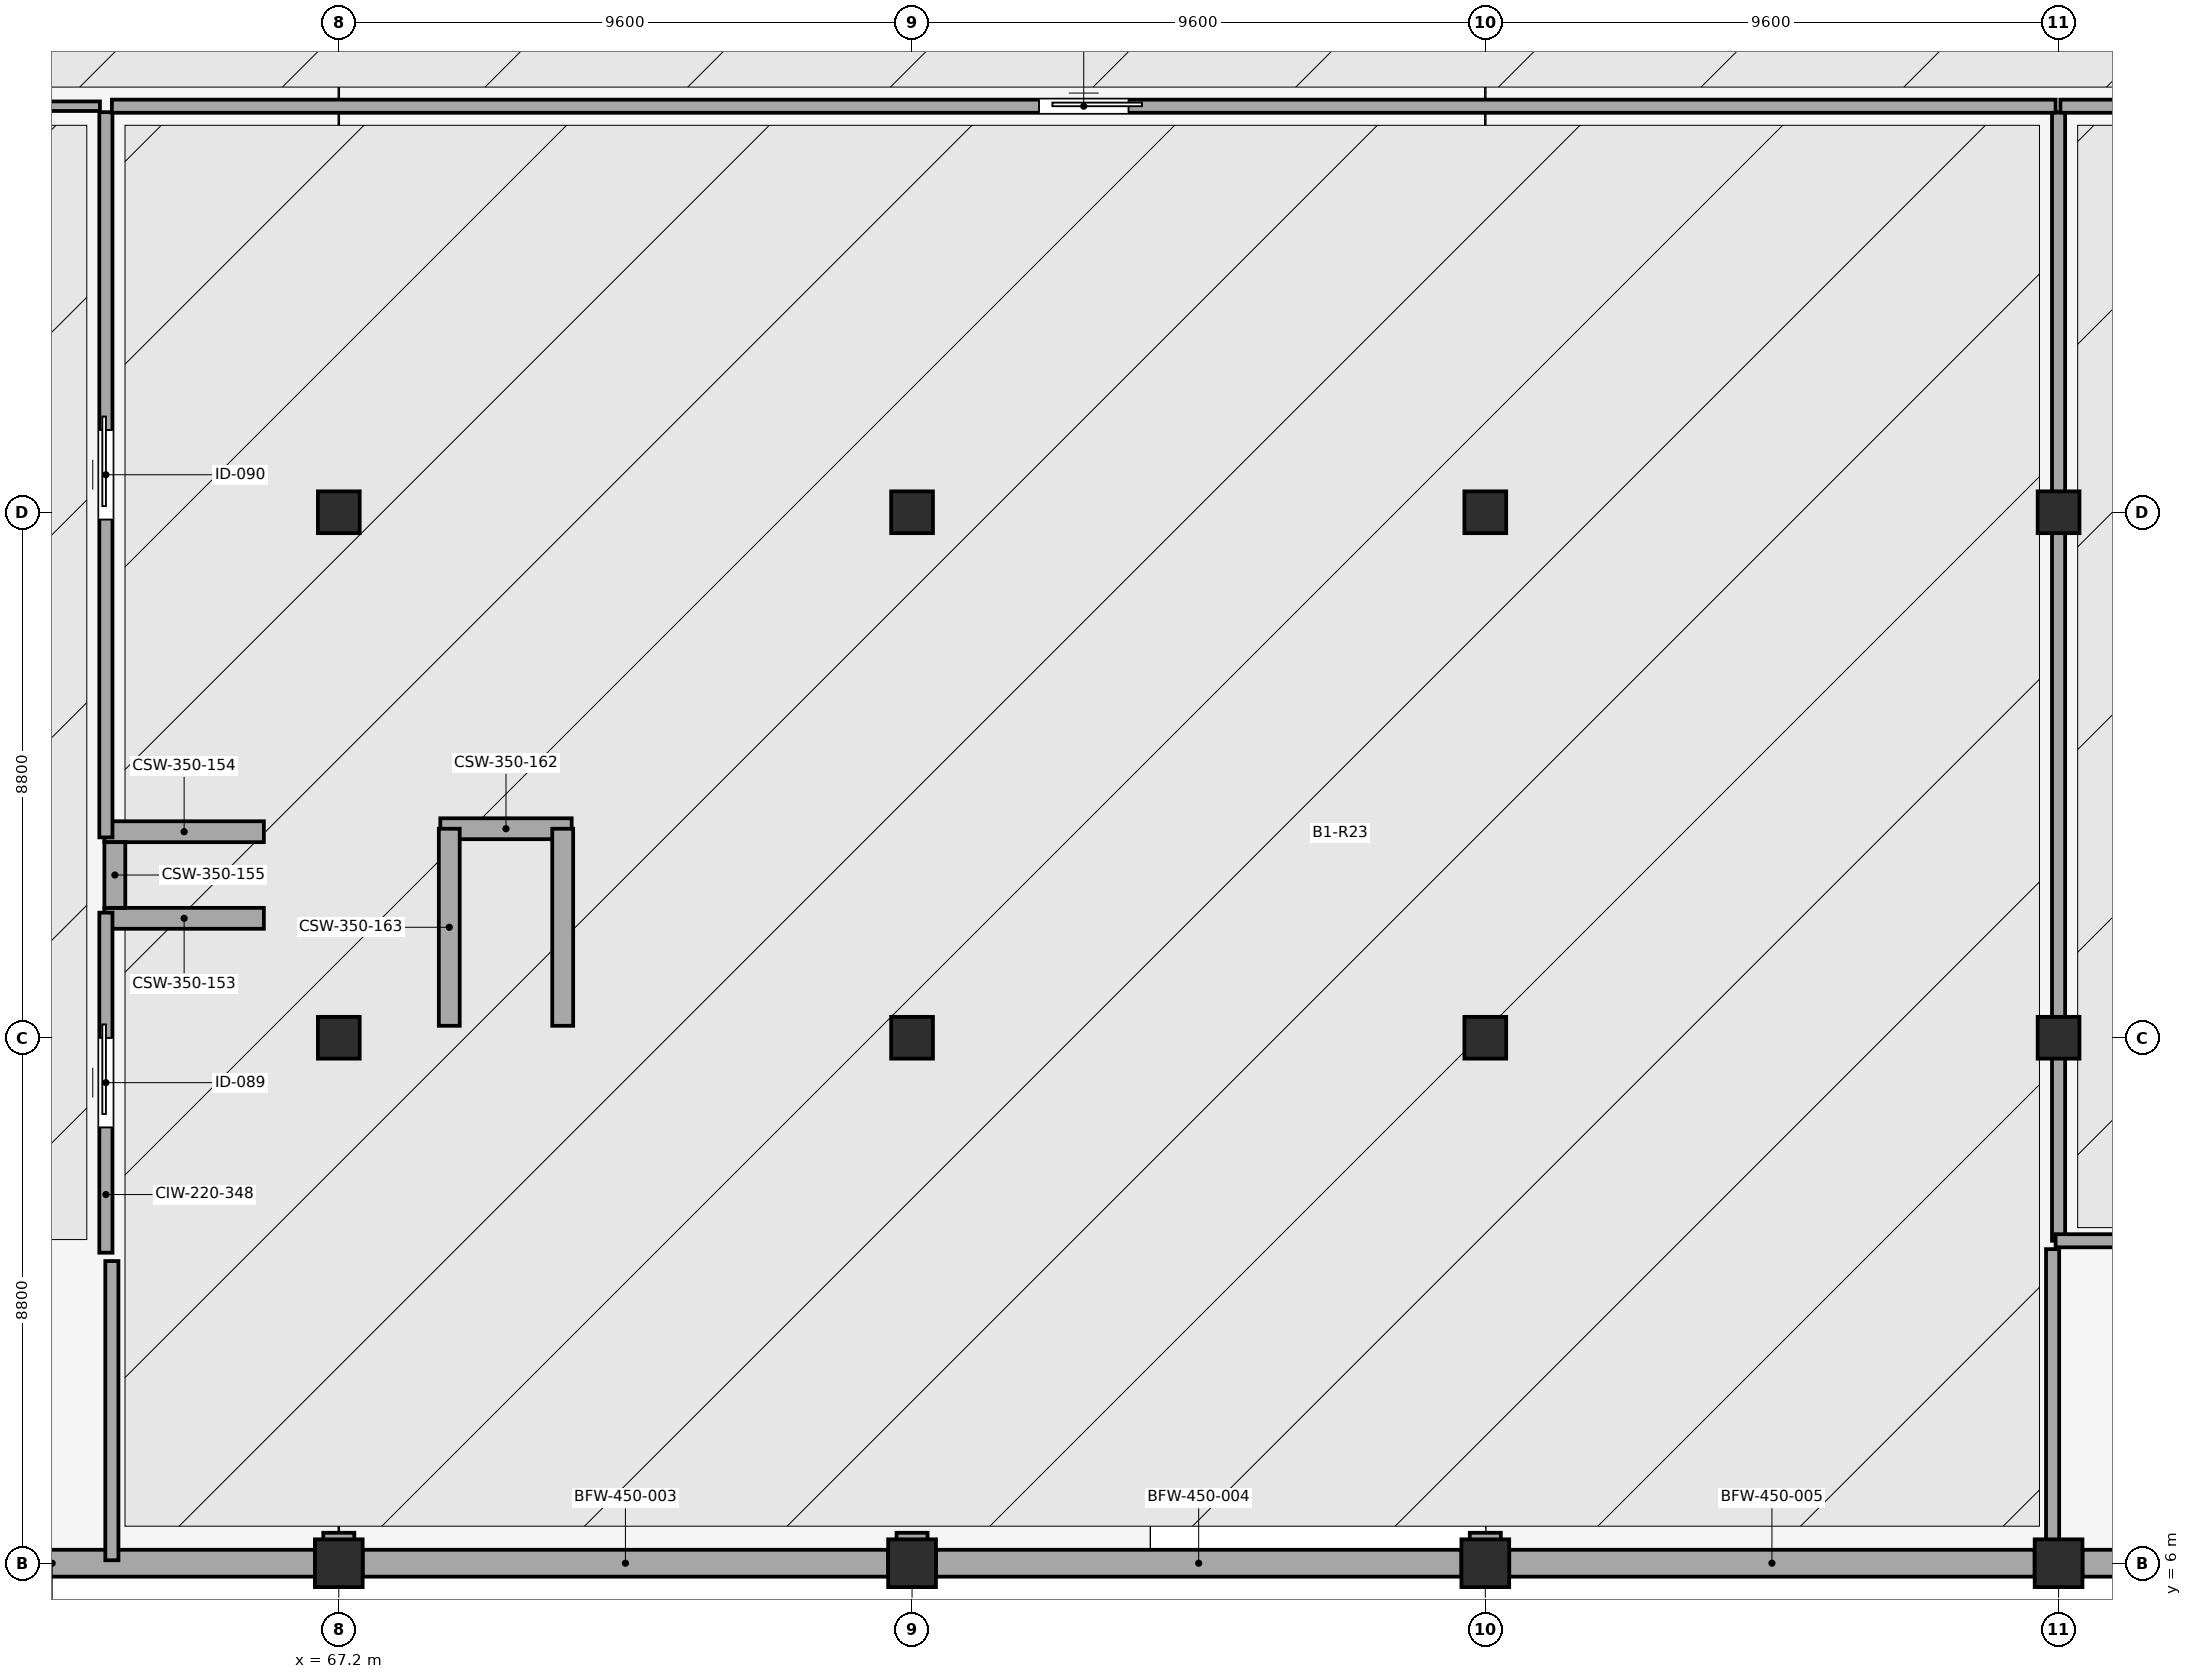
"""IFC4 building model, lengths in metres.
Left out: names, types, materials, properties, quantities, classifications, styles, units other than length and angle.
Written with IfcOpenShell. Run it as: python <this file> out.ifc"""

import sys

from ifc_helpers import new_model, si_unit, direction, frame, frame_2d, origin, origin_2d, place, context, subcontext, project, spatial, rectangle, extrude, element, fill, save


model = new_model("IFC4")
c1 = context("Model", 3, precision=1e-05, world=origin(), true_north=direction((0.0, 1.0)))
c2 = subcontext(c1, "Body", "Model", "MODEL_VIEW")
j1 = project(units=[si_unit("LENGTHUNIT", "METRE"), si_unit("PLANEANGLEUNIT", "RADIAN")], contexts=[c1])
p1 = place(None, origin())
s1 = spatial("IfcSite", under=j1, at=p1, CompositionType="ELEMENT")
p2 = place(p1, origin())
s2 = spatial("IfcBuilding", under=s1, at=p2, CompositionType="ELEMENT")
p3 = place(p2, frame((0.0, 0.0, -4.2)))
s3 = spatial("IfcBuildingStorey", under=s2, at=p3, CompositionType="ELEMENT", Elevation=-4.2)
p4 = place(p3, frame((67.2, 6.0, 0.0), z_axis=(0.0, 0.0, 1.0), x_axis=(1.0, 0.0, 0.0)))
e1 = element("IfcColumn", 1, at=p4, inside=s3, PredefinedType="COLUMN", context=c2, shape_type="SweptSolid", body=[
    extrude(rectangle(XDim=0.8, YDim=0.8, at=origin_2d()), origin(), (0.0, 0.0, 1.0), 4.2),
])
for number, where, z_axis, x_axis in (
    (2, (67.2, 14.8, 0.0), (0.0, 0.0, 1.0), (1.0, 0.0, 0.0)),
    (3, (67.2, 23.6, 0.0), (0.0, 0.0, 1.0), (1.0, 0.0, 0.0)),
):
    element("IfcColumn", number, at=place(p3, frame(where, z_axis=z_axis, x_axis=x_axis)), inside=s3, PredefinedType="COLUMN", context=c2, shape_type="SweptSolid", body=[
        extrude(rectangle(XDim=0.7, YDim=0.7, at=origin_2d()), origin(), (0.0, 0.0, 1.0), 4.2),
    ])
p5 = place(p3, frame((76.8, 6.0, 0.0), z_axis=(0.0, 0.0, 1.0), x_axis=(1.0, 0.0, 0.0)))
e4 = element("IfcColumn", 4, at=p5, inside=s3, PredefinedType="COLUMN", context=c2, shape_type="SweptSolid", body=[
    extrude(rectangle(XDim=0.8, YDim=0.8, at=origin_2d()), origin(), (0.0, 0.0, 1.0), 4.2),
])
for number, where, z_axis, x_axis in (
    (5, (76.8, 14.8, 0.0), (0.0, 0.0, 1.0), (1.0, 0.0, 0.0)),
    (6, (76.8, 23.6, 0.0), (0.0, 0.0, 1.0), (1.0, 0.0, 0.0)),
):
    element("IfcColumn", number, at=place(p3, frame(where, z_axis=z_axis, x_axis=x_axis)), inside=s3, PredefinedType="COLUMN", context=c2, shape_type="SweptSolid", body=[
        extrude(rectangle(XDim=0.7, YDim=0.7, at=origin_2d()), origin(), (0.0, 0.0, 1.0), 4.2),
    ])
p6 = place(p3, frame((86.4, 6.0, 0.0), z_axis=(0.0, 0.0, 1.0), x_axis=(1.0, 0.0, 0.0)))
e7 = element("IfcColumn", 7, at=p6, inside=s3, PredefinedType="COLUMN", context=c2, shape_type="SweptSolid", body=[
    extrude(rectangle(XDim=0.8, YDim=0.8, at=origin_2d()), origin(), (0.0, 0.0, 1.0), 4.2),
])
for number, where, z_axis, x_axis in (
    (8, (86.4, 14.8, 0.0), (0.0, 0.0, 1.0), (1.0, 0.0, 0.0)),
    (9, (86.4, 23.6, 0.0), (0.0, 0.0, 1.0), (1.0, 0.0, 0.0)),
):
    element("IfcColumn", number, at=place(p3, frame(where, z_axis=z_axis, x_axis=x_axis)), inside=s3, PredefinedType="COLUMN", context=c2, shape_type="SweptSolid", body=[
        extrude(rectangle(XDim=0.7, YDim=0.7, at=origin_2d()), origin(), (0.0, 0.0, 1.0), 4.2),
    ])
p7 = place(p3, frame((96.0, 6.0, 0.0), z_axis=(0.0, 0.0, 1.0), x_axis=(1.0, 0.0, 0.0)))
e10 = element("IfcColumn", 10, at=p7, inside=s3, PredefinedType="COLUMN", context=c2, shape_type="SweptSolid", body=[
    extrude(rectangle(XDim=0.8, YDim=0.8, at=origin_2d()), origin(), (0.0, 0.0, 1.0), 4.2),
])
for number, where, z_axis, x_axis in (
    (11, (96.0, 14.8, 0.0), (0.0, 0.0, 1.0), (1.0, 0.0, 0.0)),
    (12, (96.0, 23.6, 0.0), (0.0, 0.0, 1.0), (1.0, 0.0, 0.0)),
):
    element("IfcColumn", number, at=place(p3, frame(where, z_axis=z_axis, x_axis=x_axis)), inside=s3, PredefinedType="COLUMN", context=c2, shape_type="SweptSolid", body=[
        extrude(rectangle(XDim=0.7, YDim=0.7, at=origin_2d()), origin(), (0.0, 0.0, 1.0), 4.2),
    ])
p8 = place(p3, frame((58.0, 6.0, 0.0), z_axis=(0.0, 0.0, 1.0), x_axis=(1.0, 0.0, 0.0)))
e13 = element("IfcWall", 13, at=p8, inside=s3, PredefinedType="SOLIDWALL", context=c2, shape_type="SweptSolid", body=[
    extrude(rectangle(XDim=8.8, YDim=0.45, at=frame_2d((4.4, 0.0))), origin(), (0.0, 0.0, 1.0), 3.84),
])
p9 = place(p3, frame((67.6, 6.0, 0.0), z_axis=(0.0, 0.0, 1.0), x_axis=(1.0, 0.0, 0.0)))
e14 = element("IfcWall", 14, at=p9, inside=s3, PredefinedType="SOLIDWALL", context=c2, shape_type="SweptSolid", body=[
    extrude(rectangle(XDim=8.8, YDim=0.45, at=frame_2d((4.4, 0.0))), origin(), (0.0, 0.0, 1.0), 3.84),
])
for number, where, z_axis, x_axis in (
    (15, (77.2, 6.0, 0.0), (0.0, 0.0, 1.0), (1.0, 0.0, 0.0)),
    (16, (86.8, 6.0, 0.0), (0.0, 0.0, 1.0), (1.0, 0.0, 0.0)),
    (17, (96.4, 6.0, 0.0), (0.0, 0.0, 1.0), (1.0, 0.0, 0.0)),
):
    element("IfcWall", number, at=place(p3, frame(where, z_axis=z_axis, x_axis=x_axis)), inside=s3, PredefinedType="SOLIDWALL", context=c2, shape_type="SweptSolid", body=[
        extrude(rectangle(XDim=8.8, YDim=0.45, at=frame_2d((4.4, 0.0))), origin(), (0.0, 0.0, 1.0), 3.84),
    ])
for number, where, z_axis, x_axis in (
    (18, (63.275, 16.8, 0.0), (0.0, 0.0, 1.0), (1.0, 0.0, 0.0)),
    (19, (63.275, 18.25, 0.0), (0.0, 0.0, 1.0), (1.0, 0.0, 0.0)),
):
    element("IfcWall", number, at=place(p3, frame(where, z_axis=z_axis, x_axis=x_axis)), inside=s3, PredefinedType="SHEAR", context=c2, shape_type="SweptSolid", body=[
        extrude(rectangle(XDim=2.67, YDim=0.35, at=frame_2d((1.335, 0.0))), origin(), (0.0, 0.0, 1.0), 3.92),
    ])
p10 = place(p3, frame((63.45, 16.975, 0.0), z_axis=(0.0, 0.0, 1.0), x_axis=(0.0, 1.0, 0.0)))
e20 = element("IfcWall", 20, at=p10, inside=s3, PredefinedType="SHEAR", context=c2, shape_type="SweptSolid", body=[
    extrude(rectangle(XDim=1.1, YDim=0.35, at=frame_2d((0.55, 0.0))), origin(), (0.0, 0.0, 1.0), 3.92),
])
p11 = place(p3, frame((68.9, 18.3, 0.0), z_axis=(0.0, 0.0, 1.0), x_axis=(1.0, 0.0, 0.0)))
e21 = element("IfcWall", 21, at=p11, inside=s3, PredefinedType="SHEAR", context=c2, shape_type="SweptSolid", body=[
    extrude(rectangle(XDim=2.2, YDim=0.35, at=frame_2d((1.1, 0.0))), origin(), (0.0, 0.0, 1.0), 3.92),
])
for number, where, z_axis, x_axis in (
    (22, (69.05, 15.0, 0.0), (0.0, 0.0, 1.0), (0.0, 1.0, 0.0)),
    (23, (70.95, 15.0, 0.0), (0.0, 0.0, 1.0), (0.0, 1.0, 0.0)),
):
    element("IfcWall", number, at=place(p3, frame(where, z_axis=z_axis, x_axis=x_axis)), inside=s3, PredefinedType="SHEAR", context=c2, shape_type="SweptSolid", body=[
        extrude(rectangle(XDim=3.3, YDim=0.35, at=frame_2d((1.65, 0.0))), origin(), (0.0, 0.0, 1.0), 3.92),
    ])
p12 = place(p3, frame((63.3, 11.2, 0.0), z_axis=(0.0, 0.0, 1.0), x_axis=(0.0, 1.0, 0.0)))
e24 = element("IfcWall", 24, at=p12, inside=s3, PredefinedType="PARTITIONING", context=c2, shape_type="SweptSolid", body=[
    extrude(rectangle(XDim=5.695, YDim=0.22, at=frame_2d((2.848, 0.0))), origin(), (0.0, 0.0, 1.0), 3.84),
])
p13 = place(p12, frame((2.098, 0.0, 0.0)))
e25 = element("IfcOpeningElement", 25, at=p13, cuts=e24, PredefinedType="OPENING", context=c2, shape_type="SweptSolid", body=[
    extrude(rectangle(XDim=1.5, YDim=2.2, at=frame_2d((0.75, 1.1))), frame((0.0, 0.12, 0.0), z_axis=(0.0, -1.0, 0.0), x_axis=(1.0, 0.0, 0.0)), (0.0, 0.0, 1.0), 0.24),
])
p14 = place(p3, frame((63.3, 18.155, 0.0), z_axis=(0.0, 0.0, 1.0), x_axis=(0.0, 1.0, 0.0)))
e26 = element("IfcWall", 26, at=p14, inside=s3, PredefinedType="PARTITIONING", context=c2, shape_type="SweptSolid", body=[
    extrude(rectangle(XDim=12.145, YDim=0.22, at=frame_2d((6.073, 0.0))), origin(), (0.0, 0.0, 1.0), 3.84),
])
p15 = place(p14, frame((5.323, 0.0, 0.0)))
e27 = element("IfcOpeningElement", 27, at=p15, cuts=e26, PredefinedType="OPENING", context=c2, shape_type="SweptSolid", body=[
    extrude(rectangle(XDim=1.5, YDim=2.2, at=frame_2d((0.75, 1.1))), frame((0.0, 0.12, 0.0), z_axis=(0.0, -1.0, 0.0), x_axis=(1.0, 0.0, 0.0)), (0.0, 0.0, 1.0), 0.24),
])
p16 = place(p3, frame((55.8, 30.4, 0.0), z_axis=(0.0, 0.0, 1.0), x_axis=(1.0, 0.0, 0.0)))
e28 = element("IfcWall", 28, at=p16, inside=s3, PredefinedType="PARTITIONING", context=c2, shape_type="SweptSolid", body=[
    extrude(rectangle(XDim=7.4, YDim=0.16, at=frame_2d((3.7, 0.0))), origin(), (0.0, 0.0, 1.0), 3.84),
])
p17 = place(p16, frame((3.044, 0.0, 0.0)))
e29 = element("IfcOpeningElement", 29, at=p17, cuts=e28, PredefinedType="OPENING", context=c2, shape_type="SweptSolid", body=[
    extrude(rectangle(XDim=1.8, YDim=2.15, at=frame_2d((0.9, 1.075))), frame((0.0, 0.09, 0.0), z_axis=(0.0, -1.0, 0.0), x_axis=(1.0, 0.0, 0.0)), (0.0, 0.0, 1.0), 0.18),
])
p18 = place(p3, frame((96.0, 11.4, 0.0), z_axis=(0.0, 0.0, 1.0), x_axis=(0.0, 1.0, 0.0)))
e30 = element("IfcWall", 30, at=p18, inside=s3, PredefinedType="PARTITIONING", context=c2, shape_type="SweptSolid", body=[
    extrude(rectangle(XDim=18.9, YDim=0.22, at=frame_2d((9.45, 0.0))), origin(), (0.0, 0.0, 1.0), 3.199),
])
p19 = place(p3, frame((63.4, 30.4, 0.0), z_axis=(0.0, 0.0, 1.0), x_axis=(1.0, 0.0, 0.0)))
e31 = element("IfcWall", 31, at=p19, inside=s3, PredefinedType="PARTITIONING", context=c2, shape_type="SweptSolid", body=[
    extrude(rectangle(XDim=32.55, YDim=0.22, at=frame_2d((16.275, 0.0))), origin(), (0.0, 0.0, 1.0), 3.84),
])
p20 = place(p19, frame((15.525, 0.0, 0.0)))
e32 = element("IfcOpeningElement", 32, at=p20, cuts=e31, PredefinedType="OPENING", context=c2, shape_type="SweptSolid", body=[
    extrude(rectangle(XDim=1.5, YDim=2.2, at=frame_2d((0.75, 1.1))), frame((0.0, 0.12, 0.0), z_axis=(0.0, -1.0, 0.0), x_axis=(1.0, 0.0, 0.0)), (0.0, 0.0, 1.0), 0.24),
])
p21 = place(p3, frame((96.03, 30.4, 0.0), z_axis=(0.0, 0.0, 1.0), x_axis=(1.0, 0.0, 0.0)))
e33 = element("IfcWall", 33, at=p21, inside=s3, PredefinedType="PARTITIONING", context=c2, shape_type="SweptSolid", body=[
    extrude(rectangle(XDim=28.72, YDim=0.22, at=frame_2d((14.36, 0.0))), origin(), (0.0, 0.0, 1.0), 3.84),
])
p22 = place(p21, frame((13.61, 0.0, 0.0)))
e34 = element("IfcOpeningElement", 34, at=p22, cuts=e33, PredefinedType="OPENING", context=c2, shape_type="SweptSolid", body=[
    extrude(rectangle(XDim=1.5, YDim=2.2, at=frame_2d((0.75, 1.1))), frame((0.0, 0.12, 0.0), z_axis=(0.0, -1.0, 0.0), x_axis=(1.0, 0.0, 0.0)), (0.0, 0.0, 1.0), 0.24),
])
for number, where, z_axis, x_axis in (
    (35, (66.94, 6.4, 0.0), (0.0, 0.0, 1.0), (1.0, 0.0, 0.0)),
    (36, (76.54, 6.4, 0.0), (0.0, 0.0, 1.0), (1.0, 0.0, 0.0)),
    (37, (86.14, 6.4, 0.0), (0.0, 0.0, 1.0), (1.0, 0.0, 0.0)),
):
    element("IfcWall", number, at=place(p3, frame(where, z_axis=z_axis, x_axis=x_axis)), inside=s3, PredefinedType="PARTITIONING", context=c2, shape_type="SweptSolid", body=[
        extrude(rectangle(XDim=0.52, YDim=0.22, at=frame_2d((0.26, 0.0))), origin(), (0.0, 0.0, 1.0), 3.84),
    ])
p23 = place(p3, frame((63.4, 6.05, 0.0), z_axis=(0.0, 0.0, 1.0), x_axis=(0.0, 1.0, 0.0)))
e38 = element("IfcWall", 38, at=p23, inside=s3, PredefinedType="PARTITIONING", context=c2, shape_type="SweptSolid", body=[
    extrude(rectangle(XDim=5.01, YDim=0.22, at=frame_2d((2.505, 0.0))), origin(), (0.0, 0.0, 1.0), 3.84),
])
p24 = place(p3, frame((95.9, 6.05, 0.0), z_axis=(0.0, 0.0, 1.0), x_axis=(0.0, 1.0, 0.0)))
e39 = element("IfcWall", 39, at=p24, inside=s3, PredefinedType="PARTITIONING", context=c2, shape_type="SweptSolid", body=[
    extrude(rectangle(XDim=5.21, YDim=0.22, at=frame_2d((2.605, 0.0))), origin(), (0.0, 0.0, 1.0), 3.199),
])
p25 = place(p3, frame((95.95, 11.4, 0.0), z_axis=(0.0, 0.0, 1.0), x_axis=(1.0, 0.0, 0.0)))
e40 = element("IfcWall", 40, at=p25, inside=s3, PredefinedType="PARTITIONING", context=c2, shape_type="SweptSolid", body=[
    extrude(rectangle(XDim=14.835, YDim=0.22, at=frame_2d((7.417, 0.0))), origin(), (0.0, 0.0, 1.0), 3.84),
])
p26 = place(p13, origin())
e41 = element("IfcDoor", 41, at=p26, inside=s3, OperationType="SLIDING_TO_RIGHT", PredefinedType="DOOR", context=c2, shape_type="SweptSolid", body=[
    extrude(rectangle(XDim=1.5, YDim=2.2, at=frame_2d((0.75, 1.1))), frame((0.0, 0.025, 0.0), z_axis=(0.0, -1.0, 0.0), x_axis=(1.0, 0.0, 0.0)), (0.0, 0.0, 1.0), 0.05),
])
fill(e25, e41)
p27 = place(p15, origin())
e42 = element("IfcDoor", 42, at=p27, inside=s3, OperationType="SLIDING_TO_RIGHT", PredefinedType="DOOR", context=c2, shape_type="SweptSolid", body=[
    extrude(rectangle(XDim=1.5, YDim=2.2, at=frame_2d((0.75, 1.1))), frame((0.0, 0.025, 0.0), z_axis=(0.0, -1.0, 0.0), x_axis=(1.0, 0.0, 0.0)), (0.0, 0.0, 1.0), 0.05),
])
fill(e27, e42)
p28 = place(p20, origin())
e43 = element("IfcDoor", 43, at=p28, inside=s3, OperationType="SLIDING_TO_RIGHT", PredefinedType="DOOR", context=c2, shape_type="SweptSolid", body=[
    extrude(rectangle(XDim=1.5, YDim=2.2, at=frame_2d((0.75, 1.1))), frame((0.0, 0.025, 0.0), z_axis=(0.0, -1.0, 0.0), x_axis=(1.0, 0.0, 0.0)), (0.0, 0.0, 1.0), 0.05),
])
fill(e32, e43)
save(model, sys.argv[1])
